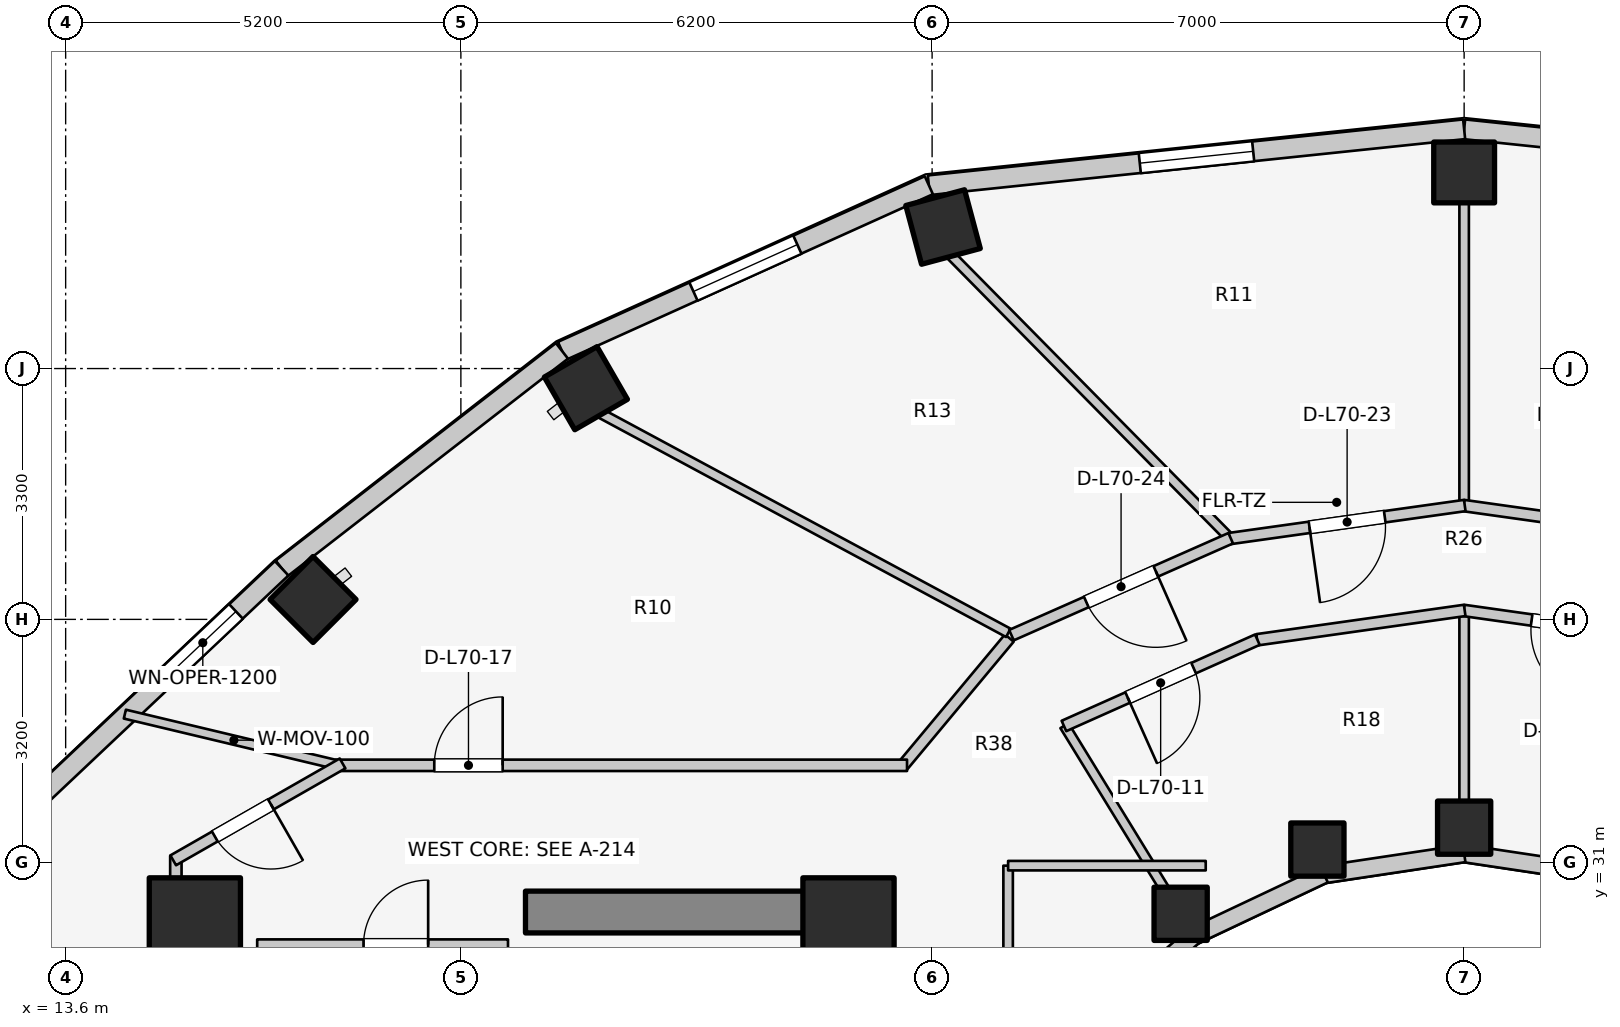
"""IFC4 building model, lengths in metres.
Left out: names, types, materials, properties, quantities, classifications, styles, units other than length and angle.
Written with IfcOpenShell. Run it as: python <this file> out.ifc"""

import sys

from ifc_helpers import new_model, si_unit, direction, frame, frame_2d, origin, origin_2d, place, context, subcontext, project, spatial, rectangle, extrude, element, fill, save


model = new_model("IFC4")
c1 = context("Model", 3, precision=1e-05, world=origin(), true_north=direction((0.0, 1.0)))
c2 = subcontext(c1, "Body", "Model", "MODEL_VIEW")
j1 = project(units=[si_unit("LENGTHUNIT", "METRE"), si_unit("PLANEANGLEUNIT", "RADIAN")], contexts=[c1])
p1 = place(None, origin())
s1 = spatial("IfcSite", under=j1, at=p1, CompositionType="ELEMENT")
p2 = place(p1, origin())
s2 = spatial("IfcBuilding", under=s1, at=p2, CompositionType="ELEMENT")
p3 = place(p2, frame((0.0, 0.0, 229.5)))
s3 = spatial("IfcBuildingStorey", under=s2, at=p3, CompositionType="ELEMENT", Elevation=229.5)
p4 = place(p3, frame((19.65, 30.35, 0.0), z_axis=(0.0, 0.0, 1.0), x_axis=(1.0, 0.0, 0.0)))
e1 = element("IfcWall", 1, at=p4, inside=s3, PredefinedType="SHEAR", context=c2, shape_type="SweptSolid", body=[
    extrude(rectangle(XDim=4.5, YDim=0.55, at=frame_2d((2.25, 0.0))), origin(), (0.0, 0.0, 1.0), 3.1),
])
for number, where, z_axis, x_axis in (
    (2, (23.9, 30.2, 0.0), (0.0, 0.0, 1.0), (1.0, 0.0, 0.0)),
    (3, (15.3, 30.2, 0.0), (0.0, 0.0, 1.0), (1.0, 0.0, 0.0)),
):
    element("IfcColumn", number, at=place(p3, frame(where, z_axis=z_axis, x_axis=x_axis)), inside=s3, PredefinedType="COLUMN", context=c2, shape_type="SweptSolid", body=[
        extrude(rectangle(XDim=1.2, YDim=1.2, at=origin_2d()), origin(), (0.0, 0.0, 1.0), 3.1),
    ])
p5 = place(p3, frame((32.0, 31.46, 0.0), z_axis=(0.0, 0.0, 1.0), x_axis=(1.0, 0.0, 0.0)))
e4 = element("IfcColumn", 4, at=p5, inside=s3, PredefinedType="COLUMN", context=c2, shape_type="SweptSolid", body=[
    extrude(rectangle(XDim=0.7, YDim=0.7, at=origin_2d()), origin(), (0.0, 0.0, 1.0), 3.1),
])
p6 = place(p3, frame((32.0, 40.08, 0.0), z_axis=(0.0, 0.0, 1.0), x_axis=(0.0, 1.0, 0.0)))
e5 = element("IfcColumn", 5, at=p6, inside=s3, PredefinedType="COLUMN", context=c2, shape_type="SweptSolid", body=[
    extrude(rectangle(XDim=0.8, YDim=0.8, at=origin_2d()), origin(), (0.0, 0.0, 1.0), 3.1),
])
p7 = place(p3, frame((30.069, 31.172, 0.0), z_axis=(0.0, 0.0, 1.0), x_axis=(1.0, 0.0, 0.0)))
e6 = element("IfcColumn", 6, at=p7, inside=s3, PredefinedType="COLUMN", context=c2, shape_type="SweptSolid", body=[
    extrude(rectangle(XDim=0.7, YDim=0.7, at=origin_2d()), origin(), (0.0, 0.0, 1.0), 3.1),
])
p8 = place(p3, frame((25.144, 39.362, 0.0), z_axis=(0.0, 0.0, 1.0), x_axis=(-0.258819045103, 0.965925826289, 0.0)))
e7 = element("IfcColumn", 7, at=p8, inside=s3, PredefinedType="COLUMN", context=c2, shape_type="SweptSolid", body=[
    extrude(rectangle(XDim=0.8, YDim=0.8, at=origin_2d()), origin(), (0.0, 0.0, 1.0), 3.1),
])
p9 = place(p3, frame((28.27, 30.327, 0.0), z_axis=(0.0, 0.0, 1.0), x_axis=(1.0, 0.0, 0.0)))
e8 = element("IfcColumn", 8, at=p9, inside=s3, PredefinedType="COLUMN", context=c2, shape_type="SweptSolid", body=[
    extrude(rectangle(XDim=0.7, YDim=0.7, at=origin_2d()), origin(), (0.0, 0.0, 1.0), 3.1),
])
for number, where, z_axis, x_axis in (
    (9, (20.445, 37.241, 0.0), (0.0, 0.0, 1.0), (-0.5, 0.866, 0.0)),
    (10, (16.855, 34.462, 0.0), (0.0, 0.0, 1.0), (-0.707, 0.707, 0.0)),
):
    element("IfcColumn", number, at=place(p3, frame(where, z_axis=z_axis, x_axis=x_axis)), inside=s3, PredefinedType="COLUMN", context=c2, shape_type="SweptSolid", body=[
        extrude(rectangle(XDim=0.8, YDim=0.8, at=origin_2d()), origin(), (0.0, 0.0, 1.0), 3.1),
    ])
for number, where, z_axis, x_axis in (
    (11, (33.843, 30.843, 0.0), (0.0, 0.0, 1.0), (-0.989, 0.149, 0.0)),
    (12, (32.0, 31.12, 0.0), (0.0, 0.0, 1.0), (-0.989, -0.149, 0.0)),
):
    element("IfcWall", number, at=place(p3, frame(where, z_axis=z_axis, x_axis=x_axis)), inside=s3, PredefinedType="STANDARD", context=c2, shape_type="SweptSolid", body=[
        extrude(rectangle(XDim=1.864, YDim=0.23, at=frame_2d((0.932, 0.0))), origin(), (0.0, 0.0, 1.0), 2.16),
    ])
p10 = place(p3, frame((30.157, 30.843, 0.0), z_axis=(0.0, 0.0, 1.0), x_axis=(-0.904179699603, -0.427152280606, 0.0)))
e13 = element("IfcWall", 13, at=p10, inside=s3, PredefinedType="STANDARD", context=c2, shape_type="SweptSolid", body=[
    extrude(rectangle(XDim=1.899, YDim=0.23, at=frame_2d((0.95, 0.0))), origin(), (0.0, 0.0, 1.0), 2.16),
])
p11 = place(p3, frame((28.44, 30.032, 0.0), z_axis=(0.0, 0.0, 1.0), x_axis=(-0.752576694707, -0.658504607869, 0.0)))
e14 = element("IfcWall", 14, at=p11, inside=s3, PredefinedType="STANDARD", context=c2, shape_type="SweptSolid", body=[
    extrude(rectangle(XDim=1.959, YDim=0.23, at=frame_2d((0.98, 0.0))), origin(), (0.0, 0.0, 1.0), 2.16),
])
p12 = place(p3, frame((39.043, 39.912, 0.0), z_axis=(0.0, 0.0, 1.0), x_axis=(-0.994582822721, 0.103947144014, 0.0)))
e15 = element("IfcWall", 15, at=p12, inside=s3, PredefinedType="STANDARD", context=c2, shape_type="SweptSolid", body=[
    extrude(rectangle(XDim=7.081, YDim=0.26, at=frame_2d((3.541, 0.0))), origin(), (0.0, 0.0, 1.0), 2.85),
])
p13 = place(p12, frame((2.341, 0.0, 0.75)))
e16 = element("IfcOpeningElement", 16, at=p13, cuts=e15, PredefinedType="OPENING", context=c2, shape_type="SweptSolid", body=[
    extrude(rectangle(XDim=2.4, YDim=1.7, at=frame_2d((1.2, 0.85))), frame((0.0, 0.14, 0.0), z_axis=(0.0, -1.0, 0.0), x_axis=(1.0, 0.0, 0.0)), (0.0, 0.0, 1.0), 0.28),
])
p14 = place(p3, frame((32.0, 40.648, 0.0), z_axis=(0.0, 0.0, 1.0), x_axis=(-0.994582822721, -0.103947144014, 0.0)))
e17 = element("IfcWall", 17, at=p14, inside=s3, PredefinedType="STANDARD", context=c2, shape_type="SweptSolid", body=[
    extrude(rectangle(XDim=7.081, YDim=0.26, at=frame_2d((3.541, 0.0))), origin(), (0.0, 0.0, 1.0), 2.85),
])
p15 = place(p14, frame((2.791, 0.0, 0.75)))
e18 = element("IfcOpeningElement", 18, at=p15, cuts=e17, PredefinedType="OPENING", context=c2, shape_type="SweptSolid", body=[
    extrude(rectangle(XDim=1.5, YDim=1.6, at=frame_2d((0.75, 0.8))), frame((0.0, 0.14, 0.0), z_axis=(0.0, -1.0, 0.0), x_axis=(1.0, 0.0, 0.0)), (0.0, 0.0, 1.0), 0.28),
])
p16 = place(p3, frame((24.957, 39.912, 0.0), z_axis=(0.0, 0.0, 1.0), x_axis=(-0.911427484938, -0.411460738952, 0.0)))
e19 = element("IfcWall", 19, at=p16, inside=s3, PredefinedType="STANDARD", context=c2, shape_type="SweptSolid", body=[
    extrude(rectangle(XDim=5.296, YDim=0.26, at=frame_2d((2.648, 0.0))), origin(), (0.0, 0.0, 1.0), 2.85),
])
p17 = place(p16, frame((1.898, 0.0, 0.75)))
e20 = element("IfcOpeningElement", 20, at=p17, cuts=e19, PredefinedType="OPENING", context=c2, shape_type="SweptSolid", body=[
    extrude(rectangle(XDim=1.5, YDim=1.6, at=frame_2d((0.75, 0.8))), frame((0.0, 0.14, 0.0), z_axis=(0.0, -1.0, 0.0), x_axis=(1.0, 0.0, 0.0)), (0.0, 0.0, 1.0), 0.28),
])
p18 = place(p3, frame((20.13, 37.733, 0.0), z_axis=(0.0, 0.0, 1.0), x_axis=(-0.790126214723, -0.612944177563, 0.0)))
e21 = element("IfcWall", 21, at=p18, inside=s3, PredefinedType="STANDARD", context=c2, shape_type="SweptSolid", body=[
    extrude(rectangle(XDim=4.667, YDim=0.26, at=frame_2d((2.333, 0.0))), origin(), (0.0, 0.0, 1.0), 2.85),
])
p19 = place(p3, frame((16.442, 34.872, 0.0), z_axis=(0.0, 0.0, 1.0), x_axis=(-0.72731899451, -0.686299555752, 0.0)))
e22 = element("IfcWall", 22, at=p19, inside=s3, PredefinedType="STANDARD", context=c2, shape_type="SweptSolid", body=[
    extrude(rectangle(XDim=4.404, YDim=0.26, at=frame_2d((2.202, 0.0))), origin(), (0.0, 0.0, 1.0), 2.85),
])
p20 = place(p19, frame((0.827, 0.0, 0.75)))
e23 = element("IfcOpeningElement", 23, at=p20, cuts=e22, PredefinedType="OPENING", context=c2, shape_type="SweptSolid", body=[
    extrude(rectangle(XDim=1.2, YDim=1.5, at=frame_2d((0.6, 0.75))), frame((0.0, 0.14, 0.0), z_axis=(0.0, -1.0, 0.0), x_axis=(1.0, 0.0, 0.0)), (0.0, 0.0, 1.0), 0.28),
])
p21 = place(p3, frame((16.12, 29.92, 0.0), z_axis=(0.0, 0.0, 1.0), x_axis=(1.0, 0.0, 0.0)))
e24 = element("IfcWall", 24, at=p21, inside=s3, PredefinedType="PLUMBINGWALL", context=c2, shape_type="SweptSolid", body=[
    extrude(rectangle(XDim=3.3, YDim=0.14, at=frame_2d((1.65, 0.0))), origin(), (0.0, 0.0, 1.0), 2.855),
])
p22 = place(p21, frame((1.399, 0.0, 0.0)))
e25 = element("IfcOpeningElement", 25, at=p22, cuts=e24, PredefinedType="OPENING", context=c2, shape_type="SweptSolid", body=[
    extrude(rectangle(XDim=0.85, YDim=2.05, at=frame_2d((0.425, 1.025))), frame((0.0, 0.08, 0.0), z_axis=(0.0, -1.0, 0.0), x_axis=(1.0, 0.0, 0.0)), (0.0, 0.0, 1.0), 0.16),
])
p23 = place(p3, frame((32.0, 31.1, 0.0), z_axis=(0.0, 0.0, 1.0), x_axis=(0.0, 1.0, 0.0)))
e26 = element("IfcWall", 26, at=p23, inside=s3, PredefinedType="PARTITIONING", context=c2, shape_type="SweptSolid", body=[
    extrude(rectangle(XDim=3.218, YDim=0.125, at=frame_2d((1.609, 0.0))), origin(), (0.0, 0.0, 1.0), 2.376),
])
p24 = place(p3, frame((28.45, 30.015, 0.0), z_axis=(0.0, 0.0, 1.0), x_axis=(-0.522763432117, 0.852477796802, 0.0)))
e27 = element("IfcWall", 27, at=p24, inside=s3, PredefinedType="PARTITIONING", context=c2, shape_type="SweptSolid", body=[
    extrude(rectangle(XDim=3.269, YDim=0.125, at=frame_2d((1.635, 0.0))), origin(), (0.0, 0.0, 1.0), 2.376),
])
p25 = place(p3, frame((34.724, 33.932, 0.0), z_axis=(0.0, 0.0, 1.0), x_axis=(-0.990150268487, 0.140008734782, 0.0)))
e28 = element("IfcWall", 28, at=p25, inside=s3, PredefinedType="PARTITIONING", context=c2, shape_type="SweptSolid", body=[
    extrude(rectangle(XDim=2.759, YDim=0.15, at=frame_2d((1.379, 0.0))), origin(), (0.0, 0.0, 1.0), 2.376),
])
p26 = place(p25, frame((0.904, 0.0, 0.0)))
e29 = element("IfcOpeningElement", 29, at=p26, cuts=e28, PredefinedType="OPENING", context=c2, shape_type="SweptSolid", body=[
    extrude(rectangle(XDim=0.95, YDim=2.1, at=frame_2d((0.475, 1.05))), frame((0.0, 0.085, 0.0), z_axis=(0.0, -1.0, 0.0), x_axis=(1.0, 0.0, 0.0)), (0.0, 0.0, 1.0), 0.17),
])
p27 = place(p3, frame((32.007, 34.318, 0.0), z_axis=(0.0, 0.0, 1.0), x_axis=(-0.990150268487, -0.140008734782, 0.0)))
e30 = element("IfcWall", 30, at=p27, inside=s3, PredefinedType="PARTITIONING", context=c2, shape_type="SweptSolid", body=[
    extrude(rectangle(XDim=2.759, YDim=0.15, at=frame_2d((1.379, 0.0))), origin(), (0.0, 0.0, 1.0), 2.376),
])
p28 = place(p3, frame((29.28, 33.933, 0.0), z_axis=(0.0, 0.0, 1.0), x_axis=(-0.913254317828, -0.407389924971, 0.0)))
e31 = element("IfcWall", 31, at=p28, inside=s3, PredefinedType="PARTITIONING", context=c2, shape_type="SweptSolid", body=[
    extrude(rectangle(XDim=2.787, YDim=0.15, at=frame_2d((1.393, 0.0))), origin(), (0.0, 0.0, 1.0), 2.376),
])
p29 = place(p28, frame((0.918, 0.0, 0.0)))
e32 = element("IfcOpeningElement", 32, at=p29, cuts=e31, PredefinedType="OPENING", context=c2, shape_type="SweptSolid", body=[
    extrude(rectangle(XDim=0.95, YDim=2.1, at=frame_2d((0.475, 1.05))), frame((0.0, 0.085, 0.0), z_axis=(0.0, -1.0, 0.0), x_axis=(1.0, 0.0, 0.0)), (0.0, 0.0, 1.0), 0.17),
])
p30 = place(p3, frame((26.0, 25.8, 0.0), z_axis=(0.0, 0.0, 1.0), x_axis=(0.0, 1.0, 0.0)))
e33 = element("IfcWall", 33, at=p30, inside=s3, PredefinedType="PARTITIONING", context=c2, shape_type="SweptSolid", body=[
    extrude(rectangle(XDim=5.16, YDim=0.125, at=frame_2d((2.58, 0.0))), origin(), (0.0, 0.0, 1.0), 2.232),
])
p31 = place(p3, frame((26.0, 30.96, 0.0), z_axis=(0.0, 0.0, 1.0), x_axis=(1.0, 0.0, 0.0)))
e34 = element("IfcWall", 34, at=p31, inside=s3, PredefinedType="PARTITIONING", context=c2, shape_type="SweptSolid", body=[
    extrude(rectangle(XDim=2.6, YDim=0.125, at=frame_2d((1.3, 0.0))), origin(), (0.0, 0.0, 1.0), 2.376),
])
p32 = place(p3, frame((15.05, 29.8, 0.0), z_axis=(0.0, 0.0, 1.0), x_axis=(0.0, 1.0, 0.0)))
e35 = element("IfcWall", 35, at=p32, inside=s3, PredefinedType="PARTITIONING", context=c2, shape_type="SweptSolid", body=[
    extrude(rectangle(XDim=1.29, YDim=0.15, at=frame_2d((0.645, 0.0))), origin(), (0.0, 0.0, 1.0), 2.855),
])
p33 = place(p3, frame((17.249, 32.268, 0.0), z_axis=(0.0, 0.0, 1.0), x_axis=(-0.972648835931, 0.232280524286, 0.0)))
e36 = element("IfcWall", 36, at=p33, inside=s3, PredefinedType="MOVABLE", context=c2, shape_type="SweptSolid", body=[
    extrude(rectangle(XDim=2.95, YDim=0.12, at=frame_2d((1.475, 0.0))), origin(), (0.0, 0.0, 1.0), 2.22),
])
p34 = place(p3, frame((26.016, 33.955, 0.0), z_axis=(0.0, 0.0, 1.0), x_axis=(-0.64030392053, -0.76812166312, 0.0)))
e37 = element("IfcWall", 37, at=p34, inside=s3, PredefinedType="PARTITIONING", context=c2, shape_type="SweptSolid", body=[
    extrude(rectangle(XDim=2.21, YDim=0.15, at=frame_2d((1.105, 0.0))), origin(), (0.0, 0.0, 1.0), 2.376),
])
p35 = place(p3, frame((17.15, 32.28, 0.0), z_axis=(0.0, 0.0, 1.0), x_axis=(1.0, 0.0, 0.0)))
e38 = element("IfcWall", 38, at=p35, inside=s3, PredefinedType="PARTITIONING", context=c2, shape_type="SweptSolid", body=[
    extrude(rectangle(XDim=7.52, YDim=0.15, at=frame_2d((3.76, 0.0))), origin(), (0.0, 0.0, 1.0), 2.376),
])
p36 = place(p35, frame((1.3, 0.0, 0.0)))
e39 = element("IfcOpeningElement", 39, at=p36, cuts=e38, PredefinedType="OPENING", context=c2, shape_type="SweptSolid", body=[
    extrude(rectangle(XDim=0.9, YDim=2.1, at=frame_2d((0.45, 1.05))), frame((0.0, 0.085, 0.0), z_axis=(0.0, -1.0, 0.0), x_axis=(1.0, 0.0, 0.0)), (0.0, 0.0, 1.0), 0.17),
])
p37 = place(p3, frame((17.243, 32.305, 0.0), z_axis=(0.0, 0.0, 1.0), x_axis=(-0.867991349648, -0.496579315857, 0.0)))
e40 = element("IfcWall", 40, at=p37, inside=s3, PredefinedType="PARTITIONING", context=c2, shape_type="SweptSolid", body=[
    extrude(rectangle(XDim=2.567, YDim=0.15, at=frame_2d((1.283, 0.0))), origin(), (0.0, 0.0, 1.0), 2.22),
])
p38 = place(p37, frame((1.086, 0.0, 0.0)))
e41 = element("IfcOpeningElement", 41, at=p38, cuts=e40, PredefinedType="OPENING", context=c2, shape_type="SweptSolid", body=[
    extrude(rectangle(XDim=0.85, YDim=2.05, at=frame_2d((0.425, 1.025))), frame((0.0, 0.085, 0.0), z_axis=(0.0, -1.0, 0.0), x_axis=(1.0, 0.0, 0.0)), (0.0, 0.0, 1.0), 0.17),
])
p39 = place(p3, frame((32.0, 35.753, 0.0), z_axis=(0.0, 0.0, 1.0), x_axis=(0.0, 1.0, 0.0)))
e42 = element("IfcWall", 42, at=p39, inside=s3, PredefinedType="PARTITIONING", context=c2, shape_type="SweptSolid", body=[
    extrude(rectangle(XDim=3.947, YDim=0.125, at=frame_2d((1.974, 0.0))), origin(), (0.0, 0.0, 1.0), 2.376),
])
p40 = place(p3, frame((28.882, 35.304, 0.0), z_axis=(0.0, 0.0, 1.0), x_axis=(-0.702191571271, 0.711988059756, 0.0)))
e43 = element("IfcWall", 43, at=p40, inside=s3, PredefinedType="PARTITIONING", context=c2, shape_type="SweptSolid", body=[
    extrude(rectangle(XDim=5.184, YDim=0.125, at=frame_2d((2.592, 0.0))), origin(), (0.0, 0.0, 1.0), 2.376),
])
p41 = place(p3, frame((26.003, 34.023, 0.0), z_axis=(0.0, 0.0, 1.0), x_axis=(-0.880531534665, 0.473987569943, 0.0)))
e44 = element("IfcWall", 44, at=p41, inside=s3, PredefinedType="PARTITIONING", context=c2, shape_type="SweptSolid", body=[
    extrude(rectangle(XDim=6.096, YDim=0.125, at=frame_2d((3.048, 0.0))), origin(), (0.0, 0.0, 1.0), 2.376),
])
p42 = place(p3, frame((35.087, 35.263, 0.0), z_axis=(0.0, 0.0, 1.0), x_axis=(-0.990268690673, 0.139168675614, 0.0)))
e45 = element("IfcWall", 45, at=p42, inside=s3, PredefinedType="PARTITIONING", context=c2, shape_type="SweptSolid", body=[
    extrude(rectangle(XDim=3.126, YDim=0.15, at=frame_2d((1.563, 0.0))), origin(), (0.0, 0.0, 1.0), 2.376),
])
p43 = place(p42, frame((1.063, 0.0, 0.0)))
e46 = element("IfcOpeningElement", 46, at=p43, cuts=e45, PredefinedType="OPENING", context=c2, shape_type="SweptSolid", body=[
    extrude(rectangle(XDim=1.0, YDim=2.1, at=frame_2d((0.5, 1.05))), frame((0.0, 0.085, 0.0), z_axis=(0.0, -1.0, 0.0), x_axis=(1.0, 0.0, 0.0)), (0.0, 0.0, 1.0), 0.17),
])
p44 = place(p3, frame((32.008, 35.698, 0.0), z_axis=(0.0, 0.0, 1.0), x_axis=(-0.990268690673, -0.139168675614, 0.0)))
e47 = element("IfcWall", 47, at=p44, inside=s3, PredefinedType="PARTITIONING", context=c2, shape_type="SweptSolid", body=[
    extrude(rectangle(XDim=3.126, YDim=0.15, at=frame_2d((1.563, 0.0))), origin(), (0.0, 0.0, 1.0), 2.376),
])
p45 = place(p44, frame((1.063, 0.0, 0.0)))
e48 = element("IfcOpeningElement", 48, at=p45, cuts=e47, PredefinedType="OPENING", context=c2, shape_type="SweptSolid", body=[
    extrude(rectangle(XDim=1.0, YDim=2.1, at=frame_2d((0.5, 1.05))), frame((0.0, 0.085, 0.0), z_axis=(0.0, -1.0, 0.0), x_axis=(1.0, 0.0, 0.0)), (0.0, 0.0, 1.0), 0.17),
])
p46 = place(p3, frame((28.929, 35.268, 0.0), z_axis=(0.0, 0.0, 1.0), x_axis=(-0.914642679993, -0.404263240891, 0.0)))
e49 = element("IfcWall", 49, at=p46, inside=s3, PredefinedType="PARTITIONING", context=c2, shape_type="SweptSolid", body=[
    extrude(rectangle(XDim=3.154, YDim=0.15, at=frame_2d((1.577, 0.0))), origin(), (0.0, 0.0, 1.0), 2.376),
])
p47 = place(p46, frame((1.077, 0.0, 0.0)))
e50 = element("IfcOpeningElement", 50, at=p47, cuts=e49, PredefinedType="OPENING", context=c2, shape_type="SweptSolid", body=[
    extrude(rectangle(XDim=1.0, YDim=2.1, at=frame_2d((0.5, 1.05))), frame((0.0, 0.085, 0.0), z_axis=(0.0, -1.0, 0.0), x_axis=(1.0, 0.0, 0.0)), (0.0, 0.0, 1.0), 0.17),
])
p48 = place(p15, origin())
e51 = element("IfcWindow", 51, at=p48, inside=s3, PartitioningType="SINGLE_PANEL", PredefinedType="WINDOW", context=c2, shape_type="SweptSolid", body=[
    extrude(rectangle(XDim=1.5, YDim=1.6, at=frame_2d((0.75, 0.8))), frame((0.0, 0.03, 0.0), z_axis=(0.0, -1.0, 0.0), x_axis=(1.0, 0.0, 0.0)), (0.0, 0.0, 1.0), 0.06),
])
fill(e18, e51)
p49 = place(p17, origin())
e52 = element("IfcWindow", 52, at=p49, inside=s3, PartitioningType="SINGLE_PANEL", PredefinedType="WINDOW", context=c2, shape_type="SweptSolid", body=[
    extrude(rectangle(XDim=1.5, YDim=1.6, at=frame_2d((0.75, 0.8))), frame((0.0, 0.03, 0.0), z_axis=(0.0, -1.0, 0.0), x_axis=(1.0, 0.0, 0.0)), (0.0, 0.0, 1.0), 0.06),
])
fill(e20, e52)
p50 = place(p20, origin())
e53 = element("IfcWindow", 53, at=p50, inside=s3, PartitioningType="SINGLE_PANEL", PredefinedType="WINDOW", context=c2, shape_type="SweptSolid", body=[
    extrude(rectangle(XDim=1.2, YDim=1.5, at=frame_2d((0.6, 0.75))), frame((0.0, 0.03, 0.0), z_axis=(0.0, -1.0, 0.0), x_axis=(1.0, 0.0, 0.0)), (0.0, 0.0, 1.0), 0.06),
])
fill(e23, e53)
p51 = place(p22, origin())
e54 = element("IfcDoor", 54, at=p51, inside=s3, OperationType="SINGLE_SWING_RIGHT", PredefinedType="DOOR", context=c2, shape_type="SweptSolid", body=[
    extrude(rectangle(XDim=0.85, YDim=2.05, at=frame_2d((0.425, 1.025))), frame((0.0, 0.025, 0.0), z_axis=(0.0, -1.0, 0.0), x_axis=(1.0, 0.0, 0.0)), (0.0, 0.0, 1.0), 0.05),
])
fill(e25, e54)
p52 = place(p26, origin())
e55 = element("IfcDoor", 55, at=p52, inside=s3, OperationType="SINGLE_SWING_LEFT", PredefinedType="DOOR", context=c2, shape_type="SweptSolid", body=[
    extrude(rectangle(XDim=0.95, YDim=2.1, at=frame_2d((0.475, 1.05))), frame((0.0, 0.025, 0.0), z_axis=(0.0, -1.0, 0.0), x_axis=(1.0, 0.0, 0.0)), (0.0, 0.0, 1.0), 0.05),
])
fill(e29, e55)
p53 = place(p29, origin())
e56 = element("IfcDoor", 56, at=p53, inside=s3, OperationType="SINGLE_SWING_RIGHT", PredefinedType="DOOR", context=c2, shape_type="SweptSolid", body=[
    extrude(rectangle(XDim=0.95, YDim=2.1, at=frame_2d((0.475, 1.05))), frame((0.0, 0.025, 0.0), z_axis=(0.0, -1.0, 0.0), x_axis=(1.0, 0.0, 0.0)), (0.0, 0.0, 1.0), 0.05),
])
fill(e32, e56)
p54 = place(p36, origin())
e57 = element("IfcDoor", 57, at=p54, inside=s3, OperationType="SINGLE_SWING_RIGHT", PredefinedType="DOOR", context=c2, shape_type="SweptSolid", body=[
    extrude(rectangle(XDim=0.9, YDim=2.1, at=frame_2d((0.45, 1.05))), frame((0.0, 0.025, 0.0), z_axis=(0.0, -1.0, 0.0), x_axis=(1.0, 0.0, 0.0)), (0.0, 0.0, 1.0), 0.05),
])
fill(e39, e57)
p55 = place(p38, origin())
e58 = element("IfcDoor", 58, at=p55, inside=s3, OperationType="SINGLE_SWING_LEFT", PredefinedType="DOOR", context=c2, shape_type="SweptSolid", body=[
    extrude(rectangle(XDim=0.85, YDim=2.05, at=frame_2d((0.425, 1.025))), frame((0.0, 0.025, 0.0), z_axis=(0.0, -1.0, 0.0), x_axis=(1.0, 0.0, 0.0)), (0.0, 0.0, 1.0), 0.05),
])
fill(e41, e58)
p56 = place(p45, origin())
e59 = element("IfcDoor", 59, at=p56, inside=s3, OperationType="SINGLE_SWING_RIGHT", PredefinedType="DOOR", context=c2, shape_type="SweptSolid", body=[
    extrude(rectangle(XDim=1.0, YDim=2.1, at=frame_2d((0.5, 1.05))), frame((0.0, 0.025, 0.0), z_axis=(0.0, -1.0, 0.0), x_axis=(1.0, 0.0, 0.0)), (0.0, 0.0, 1.0), 0.05),
])
fill(e48, e59)
p57 = place(p47, origin())
e60 = element("IfcDoor", 60, at=p57, inside=s3, OperationType="SINGLE_SWING_LEFT", PredefinedType="DOOR", context=c2, shape_type="SweptSolid", body=[
    extrude(rectangle(XDim=1.0, YDim=2.1, at=frame_2d((0.5, 1.05))), frame((0.0, 0.025, 0.0), z_axis=(0.0, -1.0, 0.0), x_axis=(1.0, 0.0, 0.0)), (0.0, 0.0, 1.0), 0.05),
])
fill(e50, e60)
save(model, sys.argv[1])
